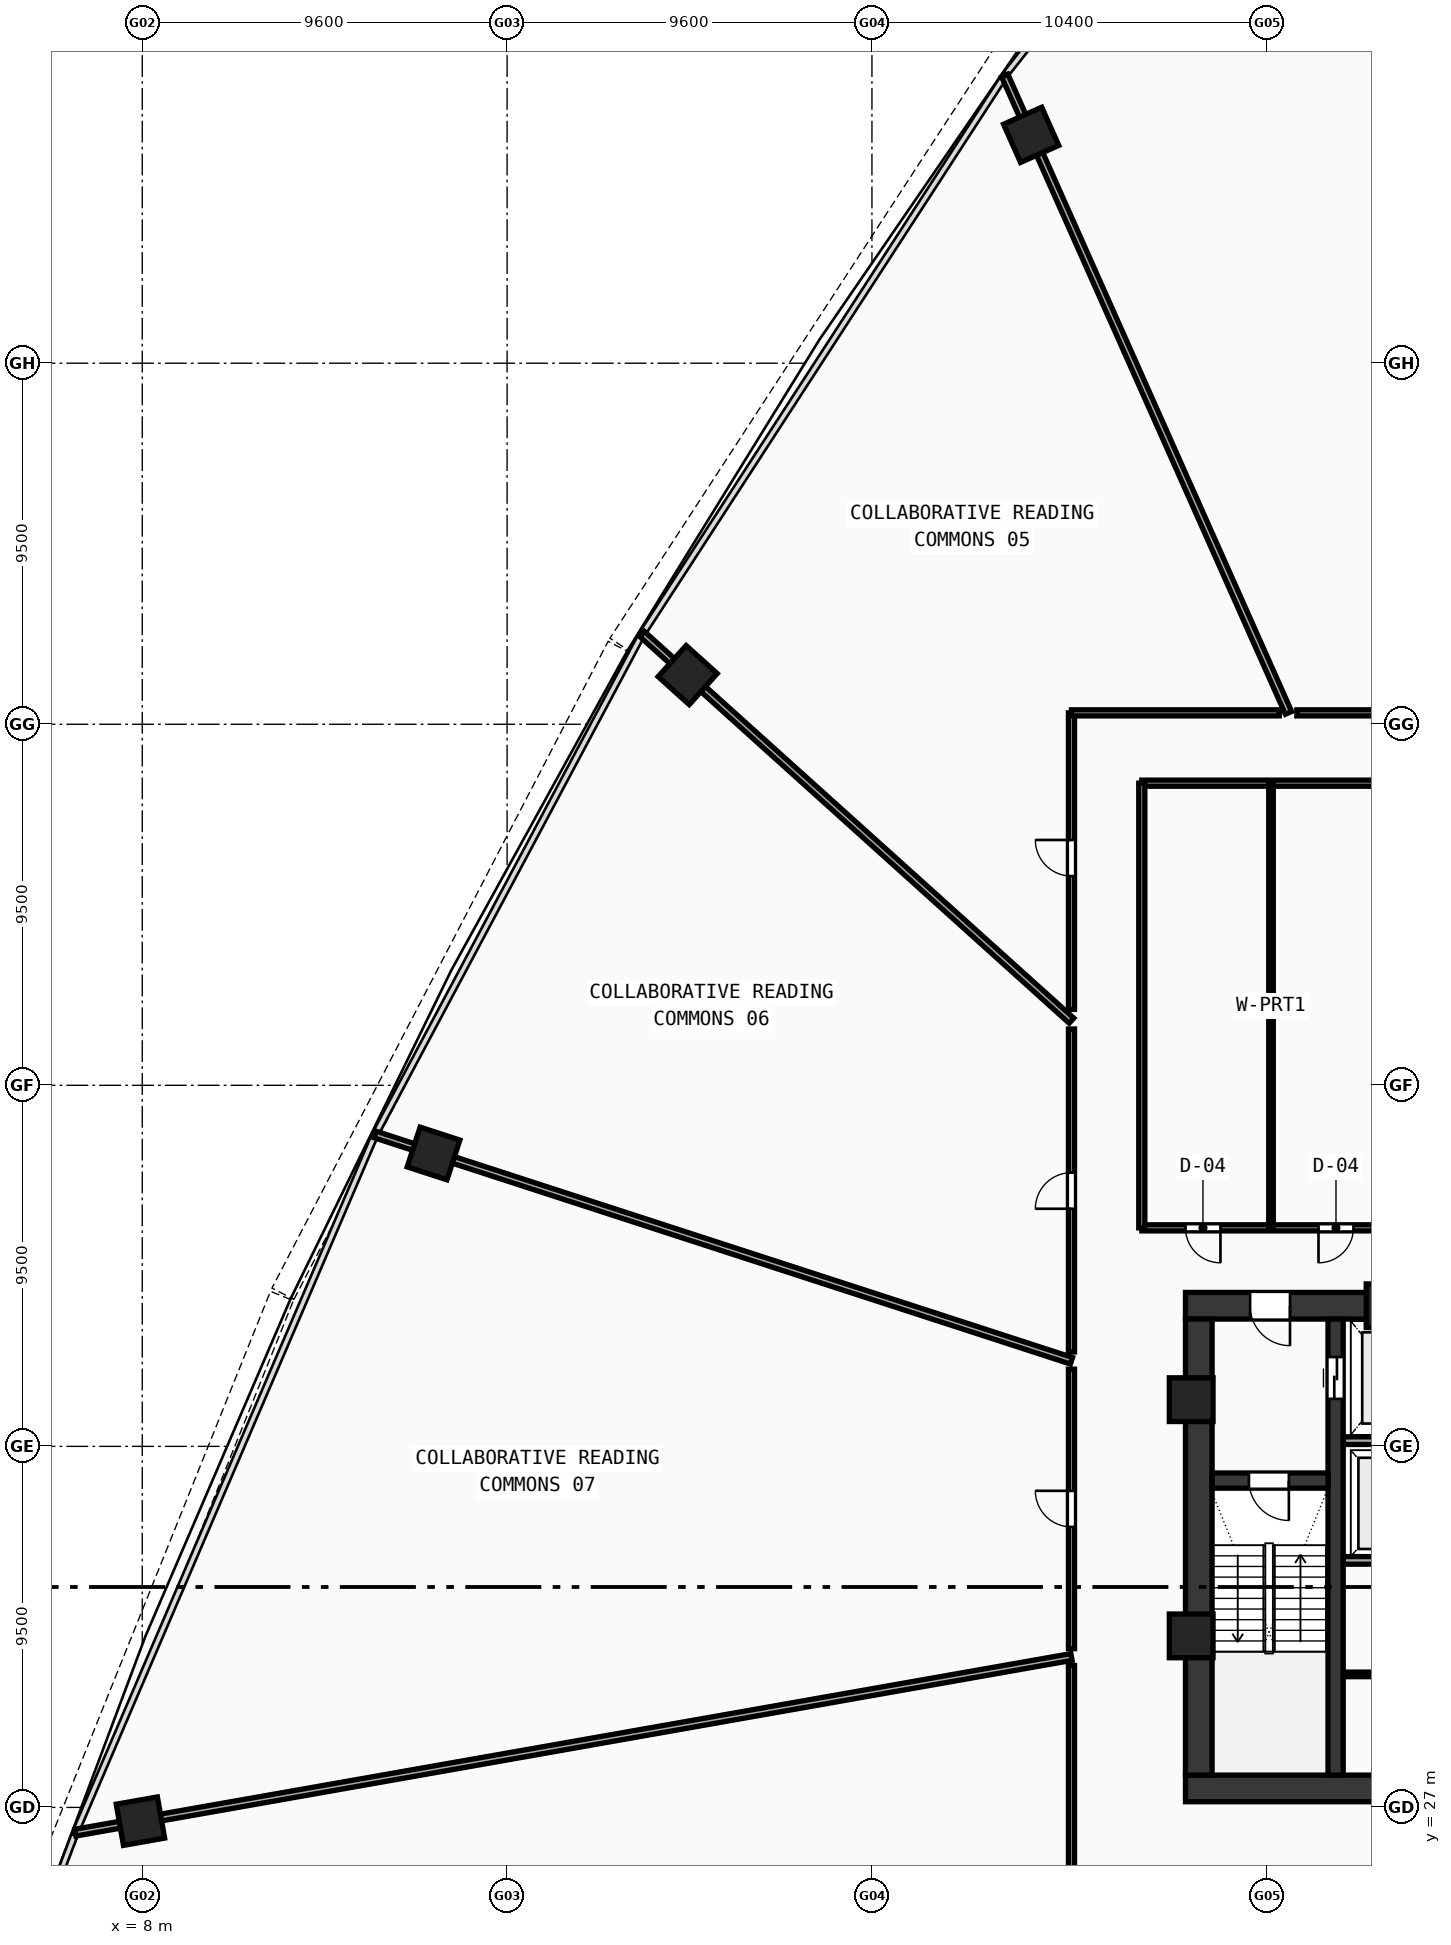
"""IFC4 building model, lengths in metres.
Left out: names, types, materials, properties, quantities, classifications, styles, units other than length and angle.
Written with IfcOpenShell. Run it as: python <this file> out.ifc"""

import sys

from ifc_helpers import new_model, si_unit, direction, frame, frame_2d, origin, origin_with_axes, origin_2d, place, context, subcontext, project, spatial, rectangle, hollow_rectangle, extrude, source, transform, mapped, element, fill, save


model = new_model("IFC4")
c1 = context("Model", 3, precision=1e-05, world=origin(), true_north=direction((0.0, 1.0)))
c2 = subcontext(c1, "Body", "Model", "MODEL_VIEW")
j1 = project(units=[si_unit("LENGTHUNIT", "METRE"), si_unit("PLANEANGLEUNIT", "RADIAN")], contexts=[c1])
p1 = place(None, origin())
s1 = spatial("IfcSite", under=j1, at=p1, CompositionType="ELEMENT")
p2 = place(p1, origin())
s2 = spatial("IfcBuilding", under=s1, at=p2, CompositionType="ELEMENT")
p3 = place(p2, frame((0.0, 0.0, 44.92)))
s3 = spatial("IfcBuildingStorey", under=s2, at=p3, CompositionType="ELEMENT", Elevation=44.92)
p4 = place(p3, frame((35.45, 27.5, 0.0), z_axis=(0.0, 0.0, 1.0), x_axis=(1.0, 0.0, 0.0)))
e1 = element("IfcWall", 1, at=p4, inside=s3, PredefinedType="SHEAR", context=c2, shape_type="SweptSolid", body=[
    extrude(rectangle(XDim=25.1, YDim=0.7, at=frame_2d((12.55, 0.0))), origin(), (0.0, 0.0, 1.0), 3.37),
])
p5 = place(p3, frame((35.45, 40.2, 0.0), z_axis=(0.0, 0.0, 1.0), x_axis=(1.0, 0.0, 0.0)))
e2 = element("IfcWall", 2, at=p5, inside=s3, PredefinedType="SHEAR", context=c2, shape_type="SweptSolid", body=[
    extrude(rectangle(XDim=11.35, YDim=0.7, at=frame_2d((5.675, 0.0))), origin(), (0.0, 0.0, 1.0), 3.37),
])
p6 = place(p5, frame((1.7, 0.0, 0.0)))
e3 = element("IfcOpeningElement", 3, at=p6, cuts=e2, PredefinedType="OPENING", context=c2, shape_type="SweptSolid", body=[
    extrude(rectangle(XDim=1.05, YDim=2.1, at=frame_2d((0.525, 1.05))), frame((0.0, 0.36, 0.0), z_axis=(0.0, -1.0, 0.0), x_axis=(1.0, 0.0, 0.0)), (0.0, 0.0, 1.0), 0.72),
])
p7 = place(p3, frame((35.8, 27.85, 0.0), z_axis=(0.0, 0.0, 1.0), x_axis=(0.0, 1.0, 0.0)))
e4 = element("IfcWall", 4, at=p7, inside=s3, PredefinedType="SHEAR", context=c2, shape_type="SweptSolid", body=[
    extrude(rectangle(XDim=12.0, YDim=0.7, at=frame_2d((6.0, 0.0))), origin(), (0.0, 0.0, 1.0), 3.37),
])
p8 = place(p3, frame((39.4, 27.85, 0.0), z_axis=(0.0, 0.0, 1.0), x_axis=(0.0, 1.0, 0.0)))
e5 = element("IfcWall", 5, at=p8, inside=s3, PredefinedType="SHEAR", context=c2, shape_type="SweptSolid", body=[
    extrude(rectangle(XDim=12.0, YDim=0.4, at=frame_2d((6.0, 0.0))), origin(), (0.0, 0.0, 1.0), 3.37),
])
p9 = place(p8, frame((9.9, 0.0, 0.0)))
e6 = element("IfcOpeningElement", 6, at=p9, cuts=e5, PredefinedType="OPENING", context=c2, shape_type="SweptSolid", body=[
    extrude(rectangle(XDim=1.1, YDim=2.1, at=frame_2d((0.55, 1.05))), frame((0.0, 0.21, 0.0), z_axis=(0.0, -1.0, 0.0), x_axis=(1.0, 0.0, 0.0)), (0.0, 0.0, 1.0), 0.42),
])
p10 = place(p3, frame((36.15, 35.6, 0.0), z_axis=(0.0, 0.0, 1.0), x_axis=(1.0, 0.0, 0.0)))
e7 = element("IfcWall", 7, at=p10, inside=s3, PredefinedType="SHEAR", context=c2, shape_type="SweptSolid", body=[
    extrude(rectangle(XDim=3.05, YDim=0.4, at=frame_2d((1.525, 0.0))), origin(), (0.0, 0.0, 1.0), 3.37),
])
p11 = place(p10, frame((0.97, 0.0, 0.0)))
e8 = element("IfcOpeningElement", 8, at=p11, cuts=e7, PredefinedType="OPENING", context=c2, shape_type="SweptSolid", body=[
    extrude(rectangle(XDim=1.05, YDim=2.1, at=frame_2d((0.525, 1.05))), frame((0.0, 0.21, 0.0), z_axis=(0.0, -1.0, 0.0), x_axis=(1.0, 0.0, 0.0)), (0.0, 0.0, 1.0), 0.42),
])
m1 = source(origin(), c2, "Body", "SweptSolid", [
    extrude(hollow_rectangle(XDim=1.15, YDim=1.15, WallThickness=0.048, at=origin_2d()), origin(), (0.0, 0.0, 1.0), 3.63),
])
for number, where, z_axis, x_axis in (
    (9, (40.781, 40.2, -0.26), (0.0, 0.0, 1.0), (1.0, 0.0, 0.0)),
    (10, (35.6, 37.729, -0.26), (0.0, 0.0, 1.0), (1.0, 0.0, 0.0)),
    (11, (35.6, 31.513, -0.26), (0.0, 0.0, 1.0), (1.0, 0.0, 0.0)),
):
    element("IfcColumn", number, at=place(p3, frame(where, z_axis=z_axis, x_axis=x_axis)), inside=s3, PredefinedType="COLUMN", context=c2, shape_type="MappedRepresentation", body=[
        mapped(m1, transform((0.0, 0.0, 0.0), scale=1.0)),
    ])
m2 = source(origin(), c2, "Body", "SweptSolid", [
    extrude(hollow_rectangle(XDim=1.1, YDim=1.1, WallThickness=0.045, at=origin_2d()), origin(), (0.0, 0.0, 1.0), 3.63),
])
for number, where, z_axis, x_axis in (
    (12, (31.389, 71.009, -0.26), (0.0, 0.0, 1.0), (-0.914, -0.407, 0.0)),
    (13, (22.351, 56.794, -0.26), (0.0, 0.0, 1.0), (-0.669, -0.743, 0.0)),
    (14, (15.665, 44.206, -0.26), (0.0, 0.0, 1.0), (-0.309, -0.951, 0.0)),
    (15, (7.952, 26.638, -0.26), (0.0, 0.0, 1.0), (0.174, -0.985, 0.0)),
):
    element("IfcColumn", number, at=place(p3, frame(where, z_axis=z_axis, x_axis=x_axis)), inside=s3, PredefinedType="COLUMN", context=c2, shape_type="MappedRepresentation", body=[
        mapped(m2, transform((0.0, 0.0, 0.0), scale=1.0)),
    ])
for number, where, z_axis, x_axis in (
    (16, (39.6, 36.65, 0.0), (0.0, 0.0, 1.0), (1.0, 0.0, 0.0)),
    (17, (39.6, 33.5, 0.0), (0.0, 0.0, 1.0), (1.0, 0.0, 0.0)),
):
    element("IfcWall", number, at=place(p3, frame(where, z_axis=z_axis, x_axis=x_axis)), inside=s3, PredefinedType="SOLIDWALL", context=c2, shape_type="SweptSolid", body=[
        extrude(rectangle(XDim=2.72, YDim=0.2, at=frame_2d((1.36, 0.0))), origin(), (0.0, 0.0, 1.0), 3.37),
    ])
p12 = place(p3, frame((39.6, 30.5, 0.0), z_axis=(0.0, 0.0, 1.0), x_axis=(1.0, 0.0, 0.0)))
e18 = element("IfcWall", 18, at=p12, inside=s3, PredefinedType="PARTITIONING", context=c2, shape_type="SweptSolid", body=[
    extrude(rectangle(XDim=2.72, YDim=0.12, at=frame_2d((1.36, 0.0))), origin(), (0.0, 0.0, 1.0), 3.37),
])
p13 = place(p3, frame((34.3, 42.25, 0.0), z_axis=(0.0, 0.0, 1.0), x_axis=(1.0, 0.0, 0.0)))
e19 = element("IfcWall", 19, at=p13, inside=s3, PredefinedType="PARTITIONING", context=c2, shape_type="SweptSolid", body=[
    extrude(rectangle(XDim=9.58, YDim=0.16, at=frame_2d((4.79, 0.0))), origin(), (0.0, 0.0, 1.0), 2.67),
])
p14 = place(p13, frame((1.15, 0.0, 0.0)))
e20 = element("IfcOpeningElement", 20, at=p14, cuts=e19, PredefinedType="OPENING", context=c2, shape_type="SweptSolid", body=[
    extrude(rectangle(XDim=0.92, YDim=2.1, at=frame_2d((0.46, 1.05))), frame((0.0, 0.09, 0.0), z_axis=(0.0, -1.0, 0.0), x_axis=(1.0, 0.0, 0.0)), (0.0, 0.0, 1.0), 0.18),
])
p15 = place(p13, frame((4.65, 0.0, 0.0)))
e21 = element("IfcOpeningElement", 21, at=p15, cuts=e19, PredefinedType="OPENING", context=c2, shape_type="SweptSolid", body=[
    extrude(rectangle(XDim=0.92, YDim=2.1, at=frame_2d((0.46, 1.05))), frame((0.0, 0.09, 0.0), z_axis=(0.0, -1.0, 0.0), x_axis=(1.0, 0.0, 0.0)), (0.0, 0.0, 1.0), 0.18),
])
p16 = place(p3, frame((34.3, 53.95, 0.0), z_axis=(0.0, 0.0, 1.0), x_axis=(1.0, 0.0, 0.0)))
e22 = element("IfcWall", 22, at=p16, inside=s3, PredefinedType="PARTITIONING", context=c2, shape_type="SweptSolid", body=[
    extrude(rectangle(XDim=9.58, YDim=0.16, at=frame_2d((4.79, 0.0))), origin(), (0.0, 0.0, 1.0), 2.67),
])
p17 = place(p3, frame((34.3, 42.25, 0.0), z_axis=(0.0, 0.0, 1.0), x_axis=(0.0, 1.0, 0.0)))
e23 = element("IfcWall", 23, at=p17, inside=s3, PredefinedType="PARTITIONING", context=c2, shape_type="SweptSolid", body=[
    extrude(rectangle(XDim=11.7, YDim=0.16, at=frame_2d((5.85, 0.0))), origin(), (0.0, 0.0, 1.0), 2.67),
])
p18 = place(p3, frame((37.7, 42.25, 0.0), z_axis=(0.0, 0.0, 1.0), x_axis=(0.0, 1.0, 0.0)))
e24 = element("IfcWall", 24, at=p18, inside=s3, PredefinedType="PARTITIONING", context=c2, shape_type="SweptSolid", body=[
    extrude(rectangle(XDim=11.7, YDim=0.12, at=frame_2d((5.85, 0.0))), origin(), (0.0, 0.0, 1.0), 2.67),
])
p19 = place(p3, frame((38.16, 55.8, 0.0), z_axis=(0.0, 0.0, 1.0), x_axis=(-0.406730734994, 0.913548088067, 0.0)))
e25 = element("IfcWall", 25, at=p19, inside=s3, PredefinedType="PARTITIONING", context=c2, shape_type="SweptSolid", body=[
    extrude(rectangle(XDim=18.356, YDim=0.18, at=frame_2d((9.178, 0.0))), origin(), (0.0, 0.0, 1.0), 2.67),
])
p20 = place(p3, frame((32.45, 47.701, 0.0), z_axis=(0.0, 0.0, 1.0), x_axis=(-0.743155181141, 0.66911910505, 0.0)))
e26 = element("IfcWall", 26, at=p20, inside=s3, PredefinedType="PARTITIONING", context=c2, shape_type="SweptSolid", body=[
    extrude(rectangle(XDim=15.202, YDim=0.18, at=frame_2d((7.601, 0.0))), origin(), (0.0, 0.0, 1.0), 2.67),
])
p21 = place(p3, frame((32.45, 38.752, 0.0), z_axis=(0.0, 0.0, 1.0), x_axis=(-0.951055021268, 0.309021595557, 0.0)))
e27 = element("IfcWall", 27, at=p21, inside=s3, PredefinedType="PARTITIONING", context=c2, shape_type="SweptSolid", body=[
    extrude(rectangle(XDim=19.264, YDim=0.18, at=frame_2d((9.632, 0.0))), origin(), (0.0, 0.0, 1.0), 2.67),
])
p22 = place(p3, frame((32.45, 30.958, 0.0), z_axis=(0.0, 0.0, 1.0), x_axis=(-0.984808390998, -0.173644559431, 0.0)))
e28 = element("IfcWall", 28, at=p22, inside=s3, PredefinedType="PARTITIONING", context=c2, shape_type="SweptSolid", body=[
    extrude(rectangle(XDim=26.614, YDim=0.18, at=frame_2d((13.307, 0.0))), origin(), (0.0, 0.0, 1.0), 2.67),
])
p23 = place(p3, frame((32.45, 24.8, 0.0), z_axis=(0.0, 0.0, 1.0), x_axis=(0.0, 1.0, 0.0)))
e29 = element("IfcWall", 29, at=p23, inside=s3, PredefinedType="PARTITIONING", context=c2, shape_type="SweptSolid", body=[
    extrude(rectangle(XDim=5.935, YDim=0.16, at=frame_2d((2.967, 0.0))), origin(), (0.0, 0.0, 1.0), 2.97),
])
p24 = place(p3, frame((32.45, 31.178, 0.0), z_axis=(0.0, 0.0, 1.0), x_axis=(0.0, 1.0, 0.0)))
e30 = element("IfcWall", 30, at=p24, inside=s3, PredefinedType="PARTITIONING", context=c2, shape_type="SweptSolid", body=[
    extrude(rectangle(XDim=7.355, YDim=0.16, at=frame_2d((3.677, 0.0))), origin(), (0.0, 0.0, 1.0), 3.37),
])
p25 = place(p24, frame((3.202, 0.0, 0.0)))
e31 = element("IfcOpeningElement", 31, at=p25, cuts=e30, PredefinedType="OPENING", context=c2, shape_type="SweptSolid", body=[
    extrude(rectangle(XDim=0.95, YDim=2.1, at=frame_2d((0.475, 1.05))), frame((0.0, 0.09, 0.0), z_axis=(0.0, -1.0, 0.0), x_axis=(1.0, 0.0, 0.0)), (0.0, 0.0, 1.0), 0.18),
])
p26 = place(p3, frame((32.45, 38.984, 0.0), z_axis=(0.0, 0.0, 1.0), x_axis=(0.0, 1.0, 0.0)))
e32 = element("IfcWall", 32, at=p26, inside=s3, PredefinedType="PARTITIONING", context=c2, shape_type="SweptSolid", body=[
    extrude(rectangle(XDim=8.498, YDim=0.16, at=frame_2d((4.249, 0.0))), origin(), (0.0, 0.0, 1.0), 2.67),
])
p27 = place(p26, frame((3.768, 0.0, 0.0)))
e33 = element("IfcOpeningElement", 33, at=p27, cuts=e32, PredefinedType="OPENING", context=c2, shape_type="SweptSolid", body=[
    extrude(rectangle(XDim=0.95, YDim=2.1, at=frame_2d((0.475, 1.05))), frame((0.0, 0.09, 0.0), z_axis=(0.0, -1.0, 0.0), x_axis=(1.0, 0.0, 0.0)), (0.0, 0.0, 1.0), 0.18),
])
p28 = place(p3, frame((32.45, 47.997, 0.0), z_axis=(0.0, 0.0, 1.0), x_axis=(0.0, 1.0, 0.0)))
e34 = element("IfcWall", 34, at=p28, inside=s3, PredefinedType="PARTITIONING", context=c2, shape_type="SweptSolid", body=[
    extrude(rectangle(XDim=7.803, YDim=0.16, at=frame_2d((3.901, 0.0))), origin(), (0.0, 0.0, 1.0), 3.37),
])
p29 = place(p28, frame((3.508, 0.0, 0.0)))
e35 = element("IfcOpeningElement", 35, at=p29, cuts=e34, PredefinedType="OPENING", context=c2, shape_type="SweptSolid", body=[
    extrude(rectangle(XDim=0.95, YDim=2.1, at=frame_2d((0.475, 1.05))), frame((0.0, 0.09, 0.0), z_axis=(0.0, -1.0, 0.0), x_axis=(1.0, 0.0, 0.0)), (0.0, 0.0, 1.0), 0.18),
])
p30 = place(p3, frame((32.45, 55.8, 0.0), z_axis=(0.0, 0.0, 1.0), x_axis=(1.0, 0.0, 0.0)))
e36 = element("IfcWall", 36, at=p30, inside=s3, PredefinedType="PARTITIONING", context=c2, shape_type="SweptSolid", body=[
    extrude(rectangle(XDim=5.47, YDim=0.16, at=frame_2d((2.735, 0.0))), origin(), (0.0, 0.0, 1.0), 3.37),
])
p31 = place(p3, frame((38.38, 55.8, 0.0), z_axis=(0.0, 0.0, 1.0), x_axis=(1.0, 0.0, 0.0)))
e37 = element("IfcWall", 37, at=p31, inside=s3, PredefinedType="PARTITIONING", context=c2, shape_type="SweptSolid", body=[
    extrude(rectangle(XDim=5.329, YDim=0.16, at=frame_2d((2.665, 0.0))), origin(), (0.0, 0.0, 1.0), 2.67),
])
m3 = source(origin(), c2, "Body", "SweptSolid", [
    extrude(rectangle(XDim=1.05, YDim=2.1, at=frame_2d((0.525, 1.05))), frame((0.0, 0.025, 0.0), z_axis=(0.0, -1.0, 0.0), x_axis=(1.0, 0.0, 0.0)), (0.0, 0.0, 1.0), 0.05),
])
p32 = place(p11, frame((1.05, 0.0, 0.0), z_axis=(0.0, 0.0, 1.0), x_axis=(-1.0, 0.0, 0.0)))
e38 = element("IfcDoor", 38, at=p32, inside=s3, OperationType="SINGLE_SWING_LEFT", PredefinedType="DOOR", context=c2, shape_type="MappedRepresentation", body=[
    mapped(m3, transform((0.0, 0.0, 0.0), scale=1.0)),
])
fill(e8, e38)
p33 = place(p6, frame((1.05, 0.0, 0.0), z_axis=(0.0, 0.0, 1.0), x_axis=(-1.0, 0.0, 0.0)))
e39 = element("IfcDoor", 39, at=p33, inside=s3, OperationType="SINGLE_SWING_LEFT", PredefinedType="DOOR", context=c2, shape_type="MappedRepresentation", body=[
    mapped(m3, transform((0.0, 0.0, 0.0), scale=1.0)),
])
fill(e3, e39)
m4 = source(origin(), c2, "Body", "SweptSolid", [
    extrude(rectangle(XDim=1.1, YDim=2.1, at=frame_2d((0.55, 1.05))), frame((0.0, 0.025, 0.0), z_axis=(0.0, -1.0, 0.0), x_axis=(1.0, 0.0, 0.0)), (0.0, 0.0, 1.0), 0.05),
])
p34 = place(p9, frame((1.1, 0.0, 0.0), z_axis=(0.0, 0.0, 1.0), x_axis=(-1.0, 0.0, 0.0)))
e40 = element("IfcDoor", 40, at=p34, inside=s3, OperationType="DOUBLE_DOOR_SLIDING", PredefinedType="DOOR", context=c2, shape_type="MappedRepresentation", body=[
    mapped(m4, transform((0.0, 0.0, 0.0), scale=1.0)),
])
fill(e6, e40)
m5 = source(origin(), c2, "Body", "SweptSolid", [
    extrude(rectangle(XDim=0.92, YDim=2.1, at=frame_2d((0.46, 1.05))), frame((0.0, 0.025, 0.0), z_axis=(0.0, -1.0, 0.0), x_axis=(1.0, 0.0, 0.0)), (0.0, 0.0, 1.0), 0.05),
])
p35 = place(p14, frame((0.92, 0.0, 0.0), z_axis=(0.0, 0.0, 1.0), x_axis=(-1.0, 0.0, 0.0)))
e41 = element("IfcDoor", 41, at=p35, inside=s3, OperationType="SINGLE_SWING_LEFT", PredefinedType="DOOR", context=c2, shape_type="MappedRepresentation", body=[
    mapped(m5, transform((0.0, 0.0, 0.0), scale=1.0)),
])
fill(e20, e41)
p36 = place(p15, frame((0.92, 0.0, 0.0), z_axis=(0.0, 0.0, 1.0), x_axis=(-1.0, 0.0, 0.0)))
e42 = element("IfcDoor", 42, at=p36, inside=s3, OperationType="SINGLE_SWING_RIGHT", PredefinedType="DOOR", context=c2, shape_type="MappedRepresentation", body=[
    mapped(m5, transform((0.0, 0.0, 0.0), scale=1.0)),
])
fill(e21, e42)
m6 = source(origin(), c2, "Body", "SweptSolid", [
    extrude(rectangle(XDim=0.95, YDim=2.1, at=frame_2d((0.475, 1.05))), frame((0.0, 0.025, 0.0), z_axis=(0.0, -1.0, 0.0), x_axis=(1.0, 0.0, 0.0)), (0.0, 0.0, 1.0), 0.05),
])
p37 = place(p29, origin_with_axes())
e43 = element("IfcDoor", 43, at=p37, inside=s3, OperationType="SINGLE_SWING_RIGHT", PredefinedType="DOOR", context=c2, shape_type="MappedRepresentation", body=[
    mapped(m6, transform((0.0, 0.0, 0.0), scale=1.0)),
])
fill(e35, e43)
p38 = place(p27, origin_with_axes())
e44 = element("IfcDoor", 44, at=p38, inside=s3, OperationType="SINGLE_SWING_LEFT", PredefinedType="DOOR", context=c2, shape_type="MappedRepresentation", body=[
    mapped(m6, transform((0.0, 0.0, 0.0), scale=1.0)),
])
fill(e33, e44)
p39 = place(p25, origin_with_axes())
e45 = element("IfcDoor", 45, at=p39, inside=s3, OperationType="SINGLE_SWING_RIGHT", PredefinedType="DOOR", context=c2, shape_type="MappedRepresentation", body=[
    mapped(m6, transform((0.0, 0.0, 0.0), scale=1.0)),
])
fill(e31, e45)
save(model, sys.argv[1])
